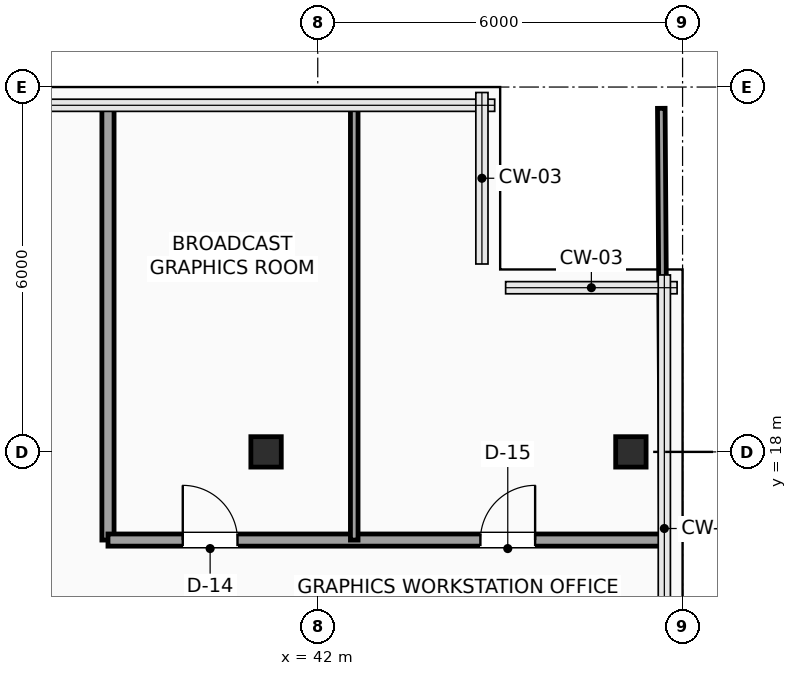
"""IFC4 building model, lengths in metres.
Left out: names, types, materials, properties, quantities, classifications, styles, units other than length and angle.
Written with IfcOpenShell. Run it as: python <this file> out.ifc"""

import sys

from ifc_helpers import new_model, si_unit, direction, frame, frame_2d, origin, origin_2d, place, context, subcontext, project, spatial, rectangle, hollow_rectangle, extrude, element, fill, save


model = new_model("IFC4")
c1 = context("Model", 3, precision=1e-05, world=origin(), true_north=direction((0.0, 1.0)))
c2 = subcontext(c1, "Body", "Model", "MODEL_VIEW")
j1 = project(units=[si_unit("LENGTHUNIT", "METRE"), si_unit("PLANEANGLEUNIT", "RADIAN")], contexts=[c1])
p1 = place(None, origin())
s1 = spatial("IfcSite", under=j1, at=p1, CompositionType="ELEMENT")
p2 = place(p1, origin())
s2 = spatial("IfcBuilding", under=s1, at=p2, CompositionType="ELEMENT")
p3 = place(p2, frame((0.0, 0.0, 149.4)))
s3 = spatial("IfcBuildingStorey", under=s2, at=p3, CompositionType="ELEMENT", Elevation=149.4)
for number, where, z_axis, x_axis in (
    (1, (41.15, 18.0, 0.0), (0.0, 0.0, 1.0), (1.0, 0.0, 0.0)),
    (2, (47.15, 18.0, 0.0), (0.0, 0.0, 1.0), (1.0, 0.0, 0.0)),
):
    element("IfcColumn", number, at=place(p3, frame(where, z_axis=z_axis, x_axis=x_axis)), inside=s3, PredefinedType="COLUMN", context=c2, shape_type="SweptSolid", body=[
        extrude(hollow_rectangle(XDim=0.5, YDim=0.5, WallThickness=0.025, InnerFilletRadius=0.025, OuterFilletRadius=0.04, at=origin_2d()), origin(), (0.0, 0.0, 1.0), 3.75),
    ])
p4 = place(p3, frame((38.55, 23.7, 0.0), z_axis=(0.0, 0.0, 1.0), x_axis=(0.0, -1.0, 0.0)))
e3 = element("IfcWall", 3, at=p4, inside=s3, PredefinedType="SOLIDWALL", context=c2, shape_type="SweptSolid", body=[
    extrude(rectangle(XDim=7.15, YDim=0.2, at=frame_2d((3.575, 0.0))), origin(), (0.0, 0.0, 1.0), 3.525),
])
p5 = place(p3, frame((38.55, 16.55, 0.0), z_axis=(0.0, 0.0, 1.0), x_axis=(1.0, 0.0, 0.0)))
e4 = element("IfcWall", 4, at=p5, inside=s3, PredefinedType="SOLIDWALL", context=c2, shape_type="SweptSolid", body=[
    extrude(rectangle(XDim=9.15, YDim=0.2, at=frame_2d((4.575, 0.0))), origin(), (0.0, 0.0, 1.0), 3.525),
])
p6 = place(p5, frame((1.23, 0.0, 0.0)))
e5 = element("IfcOpeningElement", 5, at=p6, cuts=e4, PredefinedType="OPENING", context=c2, shape_type="SweptSolid", body=[
    extrude(rectangle(XDim=0.9, YDim=2.1, at=frame_2d((0.45, 1.05))), frame((0.0, 0.11, 0.0), z_axis=(0.0, -1.0, 0.0), x_axis=(1.0, 0.0, 0.0)), (0.0, 0.0, 1.0), 0.22),
])
p7 = place(p5, frame((6.125, 0.0, 0.0)))
e6 = element("IfcOpeningElement", 6, at=p7, cuts=e4, PredefinedType="OPENING", context=c2, shape_type="SweptSolid", body=[
    extrude(rectangle(XDim=0.9, YDim=2.1, at=frame_2d((0.45, 1.05))), frame((0.0, 0.11, 0.0), z_axis=(0.0, -1.0, 0.0), x_axis=(1.0, 0.0, 0.0)), (0.0, 0.0, 1.0), 0.22),
])
p8 = place(p3, frame((42.6, 16.55, 0.0), z_axis=(0.0, 0.0, 1.0), x_axis=(0.0, 1.0, 0.0)))
e7 = element("IfcWall", 7, at=p8, inside=s3, PredefinedType="PARTITIONING", context=c2, shape_type="SweptSolid", body=[
    extrude(rectangle(XDim=7.15, YDim=0.125, at=frame_2d((3.575, 0.0))), origin(), (0.0, 0.0, 1.0), 3.525),
])
p9 = place(p3, frame((47.7, 16.55, 0.0), z_axis=(0.0, 0.0, 1.0), x_axis=(-0.007049101019, 0.999975154779, 0.0)))
e8 = element("IfcWall", 8, at=p9, inside=s3, PredefinedType="PARTITIONING", context=c2, shape_type="SweptSolid", body=[
    extrude(rectangle(XDim=7.1, YDim=0.125, at=frame_2d((3.55, 0.0))), origin(), (0.0, 0.0, 1.0), 3.525),
])
p10 = place(p6, origin())
e9 = element("IfcDoor", 9, at=p10, inside=s3, OperationType="SINGLE_SWING_LEFT", PredefinedType="DOOR", context=c2, shape_type="SweptSolid", body=[
    extrude(rectangle(XDim=0.9, YDim=2.1, at=frame_2d((0.45, 1.05))), frame((0.0, 0.025, 0.0), z_axis=(0.0, -1.0, 0.0), x_axis=(1.0, 0.0, 0.0)), (0.0, 0.0, 1.0), 0.05),
])
fill(e5, e9)
p11 = place(p7, origin())
e10 = element("IfcDoor", 10, at=p11, inside=s3, OperationType="SINGLE_SWING_RIGHT", PredefinedType="DOOR", context=c2, shape_type="SweptSolid", body=[
    extrude(rectangle(XDim=0.9, YDim=2.1, at=frame_2d((0.45, 1.05))), frame((0.0, 0.025, 0.0), z_axis=(0.0, -1.0, 0.0), x_axis=(1.0, 0.0, 0.0)), (0.0, 0.0, 1.0), 0.05),
])
fill(e6, e10)
save(model, sys.argv[1])
